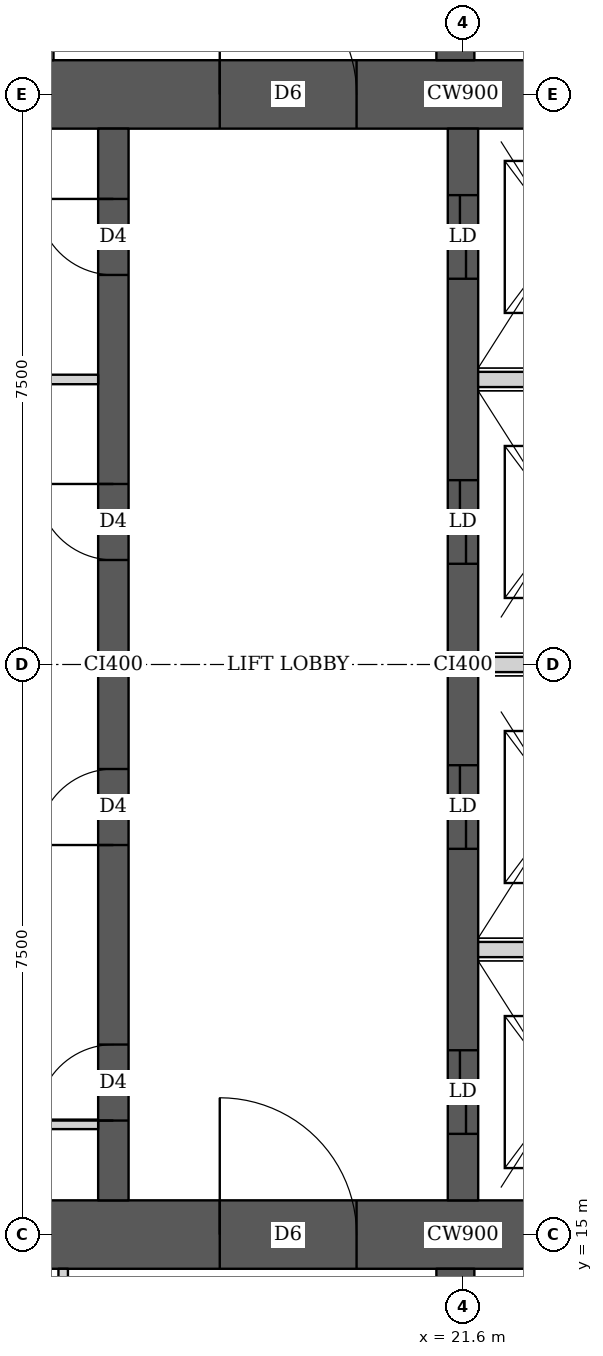
"""IFC4 building model, lengths in metres.
Left out: names, types, materials, properties, quantities, classifications, styles, units other than length and angle.
Written with IfcOpenShell. Run it as: python <this file> out.ifc"""

import sys

from ifc_helpers import new_model, si_unit, direction, frame, frame_2d, origin, place, context, subcontext, project, spatial, rectangle, extrude, element, fill, save


model = new_model("IFC4")
c1 = context("Model", 3, precision=1e-05, world=origin(), true_north=direction((0.0, 1.0)))
c2 = subcontext(c1, "Body", "Model", "MODEL_VIEW")
j1 = project(units=[si_unit("LENGTHUNIT", "METRE"), si_unit("PLANEANGLEUNIT", "RADIAN")], contexts=[c1])
p1 = place(None, origin())
s1 = spatial("IfcSite", under=j1, at=p1, CompositionType="ELEMENT")
p2 = place(p1, origin())
s2 = spatial("IfcBuilding", under=s1, at=p2, CompositionType="ELEMENT")
p3 = place(p2, frame((0.0, 0.0, 242.45)))
s3 = spatial("IfcBuildingStorey", under=s2, at=p3, CompositionType="ELEMENT", Elevation=242.45)
p4 = place(p3, frame((13.95, 15.0, 0.0), z_axis=(0.0, 0.0, 1.0), x_axis=(1.0, 0.0, 0.0)))
e1 = element("IfcWall", 1, at=p4, inside=s3, PredefinedType="SHEAR", context=c2, shape_type="SweptSolid", body=[
    extrude(rectangle(XDim=15.3, YDim=0.9, at=frame_2d((7.65, 0.0))), origin(), (0.0, 0.0, 1.0), 3.75),
])
p5 = place(p4, frame((4.45, 0.0, 0.0)))
e2 = element("IfcOpeningElement", 2, at=p5, cuts=e1, PredefinedType="OPENING", context=c2, shape_type="SweptSolid", body=[
    extrude(rectangle(XDim=1.8, YDim=2.1, at=frame_2d((0.9, 1.05))), frame((0.0, 0.46, 0.0), z_axis=(0.0, -1.0, 0.0), x_axis=(1.0, 0.0, 0.0)), (0.0, 0.0, 1.0), 0.92),
])
p6 = place(p4, frame((10.7, 0.0, 0.0)))
e3 = element("IfcOpeningElement", 3, at=p6, cuts=e1, PredefinedType="OPENING", context=c2, shape_type="SweptSolid", body=[
    extrude(rectangle(XDim=1.1, YDim=2.1, at=frame_2d((0.55, 1.05))), frame((0.0, 0.46, 0.0), z_axis=(0.0, -1.0, 0.0), x_axis=(1.0, 0.0, 0.0)), (0.0, 0.0, 1.0), 0.92),
])
p7 = place(p3, frame((13.95, 30.0, 0.0), z_axis=(0.0, 0.0, 1.0), x_axis=(1.0, 0.0, 0.0)))
e4 = element("IfcWall", 4, at=p7, inside=s3, PredefinedType="SHEAR", context=c2, shape_type="SweptSolid", body=[
    extrude(rectangle(XDim=15.3, YDim=0.9, at=frame_2d((7.65, 0.0))), origin(), (0.0, 0.0, 1.0), 3.75),
])
p8 = place(p7, frame((4.45, 0.0, 0.0)))
e5 = element("IfcOpeningElement", 5, at=p8, cuts=e4, PredefinedType="OPENING", context=c2, shape_type="SweptSolid", body=[
    extrude(rectangle(XDim=1.8, YDim=2.1, at=frame_2d((0.9, 1.05))), frame((0.0, 0.46, 0.0), z_axis=(0.0, -1.0, 0.0), x_axis=(1.0, 0.0, 0.0)), (0.0, 0.0, 1.0), 0.92),
])
p9 = place(p7, frame((10.7, 0.0, 0.0)))
e6 = element("IfcOpeningElement", 6, at=p9, cuts=e4, PredefinedType="OPENING", context=c2, shape_type="SweptSolid", body=[
    extrude(rectangle(XDim=1.1, YDim=2.1, at=frame_2d((0.55, 1.05))), frame((0.0, 0.46, 0.0), z_axis=(0.0, -1.0, 0.0), x_axis=(1.0, 0.0, 0.0)), (0.0, 0.0, 1.0), 0.92),
])
p10 = place(p3, frame((17.0, 15.45, 0.0), z_axis=(0.0, 0.0, 1.0), x_axis=(0.0, 1.0, 0.0)))
e7 = element("IfcWall", 7, at=p10, inside=s3, PredefinedType="SHEAR", context=c2, shape_type="SweptSolid", body=[
    extrude(rectangle(XDim=14.1, YDim=0.4, at=frame_2d((7.05, 0.0))), origin(), (0.0, 0.0, 1.0), 3.75),
])
p11 = place(p10, frame((1.05, 0.0, 0.0)))
e8 = element("IfcOpeningElement", 8, at=p11, cuts=e7, PredefinedType="OPENING", context=c2, shape_type="SweptSolid", body=[
    extrude(rectangle(XDim=1.0, YDim=2.1, at=frame_2d((0.5, 1.05))), frame((0.0, 0.21, 0.0), z_axis=(0.0, -1.0, 0.0), x_axis=(1.0, 0.0, 0.0)), (0.0, 0.0, 1.0), 0.42),
])
p12 = place(p10, frame((4.675, 0.0, 0.0)))
e9 = element("IfcOpeningElement", 9, at=p12, cuts=e7, PredefinedType="OPENING", context=c2, shape_type="SweptSolid", body=[
    extrude(rectangle(XDim=1.0, YDim=2.1, at=frame_2d((0.5, 1.05))), frame((0.0, 0.21, 0.0), z_axis=(0.0, -1.0, 0.0), x_axis=(1.0, 0.0, 0.0)), (0.0, 0.0, 1.0), 0.42),
])
p13 = place(p10, frame((8.425, 0.0, 0.0)))
e10 = element("IfcOpeningElement", 10, at=p13, cuts=e7, PredefinedType="OPENING", context=c2, shape_type="SweptSolid", body=[
    extrude(rectangle(XDim=1.0, YDim=2.1, at=frame_2d((0.5, 1.05))), frame((0.0, 0.21, 0.0), z_axis=(0.0, -1.0, 0.0), x_axis=(1.0, 0.0, 0.0)), (0.0, 0.0, 1.0), 0.42),
])
p14 = place(p10, frame((12.175, 0.0, 0.0)))
e11 = element("IfcOpeningElement", 11, at=p14, cuts=e7, PredefinedType="OPENING", context=c2, shape_type="SweptSolid", body=[
    extrude(rectangle(XDim=1.0, YDim=2.1, at=frame_2d((0.5, 1.05))), frame((0.0, 0.21, 0.0), z_axis=(0.0, -1.0, 0.0), x_axis=(1.0, 0.0, 0.0)), (0.0, 0.0, 1.0), 0.42),
])
p15 = place(p3, frame((21.6, 15.45, 0.0), z_axis=(0.0, 0.0, 1.0), x_axis=(0.0, 1.0, 0.0)))
e12 = element("IfcWall", 12, at=p15, inside=s3, PredefinedType="SHEAR", context=c2, shape_type="SweptSolid", body=[
    extrude(rectangle(XDim=14.1, YDim=0.4, at=frame_2d((7.05, 0.0))), origin(), (0.0, 0.0, 1.0), 3.75),
])
p16 = place(p15, frame((0.875, 0.0, 0.0)))
e13 = element("IfcOpeningElement", 13, at=p16, cuts=e12, PredefinedType="OPENING", context=c2, shape_type="SweptSolid", body=[
    extrude(rectangle(XDim=1.1, YDim=2.1, at=frame_2d((0.55, 1.05))), frame((0.0, 0.21, 0.0), z_axis=(0.0, -1.0, 0.0), x_axis=(1.0, 0.0, 0.0)), (0.0, 0.0, 1.0), 0.42),
])
p17 = place(p15, frame((4.625, 0.0, 0.0)))
e14 = element("IfcOpeningElement", 14, at=p17, cuts=e12, PredefinedType="OPENING", context=c2, shape_type="SweptSolid", body=[
    extrude(rectangle(XDim=1.1, YDim=2.1, at=frame_2d((0.55, 1.05))), frame((0.0, 0.21, 0.0), z_axis=(0.0, -1.0, 0.0), x_axis=(1.0, 0.0, 0.0)), (0.0, 0.0, 1.0), 0.42),
])
p18 = place(p15, frame((8.375, 0.0, 0.0)))
e15 = element("IfcOpeningElement", 15, at=p18, cuts=e12, PredefinedType="OPENING", context=c2, shape_type="SweptSolid", body=[
    extrude(rectangle(XDim=1.1, YDim=2.1, at=frame_2d((0.55, 1.05))), frame((0.0, 0.21, 0.0), z_axis=(0.0, -1.0, 0.0), x_axis=(1.0, 0.0, 0.0)), (0.0, 0.0, 1.0), 0.42),
])
p19 = place(p15, frame((12.125, 0.0, 0.0)))
e16 = element("IfcOpeningElement", 16, at=p19, cuts=e12, PredefinedType="OPENING", context=c2, shape_type="SweptSolid", body=[
    extrude(rectangle(XDim=1.1, YDim=2.1, at=frame_2d((0.55, 1.05))), frame((0.0, 0.21, 0.0), z_axis=(0.0, -1.0, 0.0), x_axis=(1.0, 0.0, 0.0)), (0.0, 0.0, 1.0), 0.42),
])
for number, where, z_axis, x_axis in (
    (17, (21.5, 10.35, 0.0), (0.0, 0.0, 1.0), (0.0, 1.0, 0.0)),
    (18, (21.5, 30.45, 0.0), (0.0, 0.0, 1.0), (0.0, 1.0, 0.0)),
):
    element("IfcWall", number, at=place(p3, frame(where, z_axis=z_axis, x_axis=x_axis)), inside=s3, PredefinedType="SHEAR", context=c2, shape_type="SweptSolid", body=[
        extrude(rectangle(XDim=4.2, YDim=0.5, at=frame_2d((2.1, 0.0))), origin(), (0.0, 0.0, 1.0), 3.75),
    ])
p20 = place(p3, frame((16.34, 10.762, 0.0), z_axis=(0.0, 0.0, 1.0), x_axis=(0.0, 1.0, 0.0)))
e19 = element("IfcWall", 19, at=p20, inside=s3, PredefinedType="PARTITIONING", context=c2, shape_type="SweptSolid", body=[
    extrude(rectangle(XDim=3.788, YDim=0.125, at=frame_2d((1.894, 0.0))), origin(), (0.0, 0.0, 1.0), 3.45),
])
p21 = place(p20, frame((1.338, 0.0, 0.0)))
e20 = element("IfcOpeningElement", 20, at=p21, cuts=e19, PredefinedType="OPENING", context=c2, shape_type="SweptSolid", body=[
    extrude(rectangle(XDim=1.0, YDim=2.1, at=frame_2d((0.5, 1.05))), frame((0.0, 0.073, 0.0), z_axis=(0.0, -1.0, 0.0), x_axis=(1.0, 0.0, 0.0)), (0.0, 0.0, 1.0), 0.145),
])
p22 = place(p3, frame((16.15, 30.45, 0.0), z_axis=(0.0, 0.0, 1.0), x_axis=(0.0, 1.0, 0.0)))
e21 = element("IfcWall", 21, at=p22, inside=s3, PredefinedType="PARTITIONING", context=c2, shape_type="SweptSolid", body=[
    extrude(rectangle(XDim=4.387, YDim=0.125, at=frame_2d((2.193, 0.0))), origin(), (0.0, 0.0, 1.0), 3.45),
])
p23 = place(p22, frame((1.75, 0.0, 0.0)))
e22 = element("IfcOpeningElement", 22, at=p23, cuts=e21, PredefinedType="OPENING", context=c2, shape_type="SweptSolid", body=[
    extrude(rectangle(XDim=1.0, YDim=2.1, at=frame_2d((0.5, 1.05))), frame((0.0, 0.073, 0.0), z_axis=(0.0, -1.0, 0.0), x_axis=(1.0, 0.0, 0.0)), (0.0, 0.0, 1.0), 0.145),
])
p24 = place(p3, frame((14.85, 16.45, 0.0), z_axis=(0.0, 0.0, 1.0), x_axis=(1.0, 0.0, 0.0)))
e23 = element("IfcWall", 23, at=p24, inside=s3, PredefinedType="PARTITIONING", context=c2, shape_type="SweptSolid", body=[
    extrude(rectangle(XDim=1.95, YDim=0.125, at=frame_2d((0.975, 0.0))), origin(), (0.0, 0.0, 1.0), 3.45),
])
p25 = place(p24, frame((0.2, 0.0, 0.0)))
e24 = element("IfcOpeningElement", 24, at=p25, cuts=e23, PredefinedType="OPENING", context=c2, shape_type="SweptSolid", body=[
    extrude(rectangle(XDim=1.0, YDim=2.1, at=frame_2d((0.5, 1.05))), frame((0.0, 0.073, 0.0), z_axis=(0.0, -1.0, 0.0), x_axis=(1.0, 0.0, 0.0)), (0.0, 0.0, 1.0), 0.145),
])
p26 = place(p3, frame((14.85, 26.25, 0.0), z_axis=(0.0, 0.0, 1.0), x_axis=(1.0, 0.0, 0.0)))
e25 = element("IfcWall", 25, at=p26, inside=s3, PredefinedType="PARTITIONING", context=c2, shape_type="SweptSolid", body=[
    extrude(rectangle(XDim=1.95, YDim=0.125, at=frame_2d((0.975, 0.0))), origin(), (0.0, 0.0, 1.0), 3.45),
])
for number, where, z_axis, x_axis in (
    (26, (21.8, 18.75, 0.0), (0.0, 0.0, 1.0), (1.0, 0.0, 0.0)),
    (27, (21.8, 22.5, 0.0), (0.0, 0.0, 1.0), (1.0, 0.0, 0.0)),
    (28, (21.8, 26.25, 0.0), (0.0, 0.0, 1.0), (1.0, 0.0, 0.0)),
):
    element("IfcWall", number, at=place(p3, frame(where, z_axis=z_axis, x_axis=x_axis)), inside=s3, PredefinedType="SOLIDWALL", context=c2, shape_type="SweptSolid", body=[
        extrude(rectangle(XDim=2.2, YDim=0.2, at=frame_2d((1.1, 0.0))), origin(), (0.0, 0.0, 1.0), 3.45),
    ])
p27 = place(p11, origin())
e29 = element("IfcDoor", 29, at=p27, inside=s3, OperationType="SINGLE_SWING_LEFT", PredefinedType="DOOR", context=c2, shape_type="SweptSolid", body=[
    extrude(rectangle(XDim=1.0, YDim=2.1, at=frame_2d((0.5, 1.05))), frame((0.0, 0.025, 0.0), z_axis=(0.0, -1.0, 0.0), x_axis=(1.0, 0.0, 0.0)), (0.0, 0.0, 1.0), 0.05),
])
fill(e8, e29)
p28 = place(p12, origin())
e30 = element("IfcDoor", 30, at=p28, inside=s3, OperationType="SINGLE_SWING_LEFT", PredefinedType="DOOR", context=c2, shape_type="SweptSolid", body=[
    extrude(rectangle(XDim=1.0, YDim=2.1, at=frame_2d((0.5, 1.05))), frame((0.0, 0.025, 0.0), z_axis=(0.0, -1.0, 0.0), x_axis=(1.0, 0.0, 0.0)), (0.0, 0.0, 1.0), 0.05),
])
fill(e9, e30)
p29 = place(p13, origin())
e31 = element("IfcDoor", 31, at=p29, inside=s3, OperationType="SINGLE_SWING_RIGHT", PredefinedType="DOOR", context=c2, shape_type="SweptSolid", body=[
    extrude(rectangle(XDim=1.0, YDim=2.1, at=frame_2d((0.5, 1.05))), frame((0.0, 0.025, 0.0), z_axis=(0.0, -1.0, 0.0), x_axis=(1.0, 0.0, 0.0)), (0.0, 0.0, 1.0), 0.05),
])
fill(e10, e31)
p30 = place(p14, origin())
e32 = element("IfcDoor", 32, at=p30, inside=s3, OperationType="SINGLE_SWING_RIGHT", PredefinedType="DOOR", context=c2, shape_type="SweptSolid", body=[
    extrude(rectangle(XDim=1.0, YDim=2.1, at=frame_2d((0.5, 1.05))), frame((0.0, 0.025, 0.0), z_axis=(0.0, -1.0, 0.0), x_axis=(1.0, 0.0, 0.0)), (0.0, 0.0, 1.0), 0.05),
])
fill(e11, e32)
p31 = place(p5, origin())
e33 = element("IfcDoor", 33, at=p31, inside=s3, OperationType="DOUBLE_DOOR_SINGLE_SWING", PredefinedType="DOOR", context=c2, shape_type="SweptSolid", body=[
    extrude(rectangle(XDim=1.8, YDim=2.1, at=frame_2d((0.9, 1.05))), frame((0.0, 0.025, 0.0), z_axis=(0.0, -1.0, 0.0), x_axis=(1.0, 0.0, 0.0)), (0.0, 0.0, 1.0), 0.05),
])
fill(e2, e33)
p32 = place(p8, origin())
e34 = element("IfcDoor", 34, at=p32, inside=s3, OperationType="DOUBLE_DOOR_SINGLE_SWING", PredefinedType="DOOR", context=c2, shape_type="SweptSolid", body=[
    extrude(rectangle(XDim=1.8, YDim=2.1, at=frame_2d((0.9, 1.05))), frame((0.0, 0.025, 0.0), z_axis=(0.0, -1.0, 0.0), x_axis=(1.0, 0.0, 0.0)), (0.0, 0.0, 1.0), 0.05),
])
fill(e5, e34)
p33 = place(p16, origin())
e35 = element("IfcDoor", 35, at=p33, inside=s3, OperationType="DOUBLE_DOOR_SLIDING", PredefinedType="DOOR", context=c2, shape_type="SweptSolid", body=[
    extrude(rectangle(XDim=1.1, YDim=2.1, at=frame_2d((0.55, 1.05))), frame((0.0, 0.025, 0.0), z_axis=(0.0, -1.0, 0.0), x_axis=(1.0, 0.0, 0.0)), (0.0, 0.0, 1.0), 0.05),
])
fill(e13, e35)
p34 = place(p17, origin())
e36 = element("IfcDoor", 36, at=p34, inside=s3, OperationType="DOUBLE_DOOR_SLIDING", PredefinedType="DOOR", context=c2, shape_type="SweptSolid", body=[
    extrude(rectangle(XDim=1.1, YDim=2.1, at=frame_2d((0.55, 1.05))), frame((0.0, 0.025, 0.0), z_axis=(0.0, -1.0, 0.0), x_axis=(1.0, 0.0, 0.0)), (0.0, 0.0, 1.0), 0.05),
])
fill(e14, e36)
p35 = place(p18, origin())
e37 = element("IfcDoor", 37, at=p35, inside=s3, OperationType="DOUBLE_DOOR_SLIDING", PredefinedType="DOOR", context=c2, shape_type="SweptSolid", body=[
    extrude(rectangle(XDim=1.1, YDim=2.1, at=frame_2d((0.55, 1.05))), frame((0.0, 0.025, 0.0), z_axis=(0.0, -1.0, 0.0), x_axis=(1.0, 0.0, 0.0)), (0.0, 0.0, 1.0), 0.05),
])
fill(e15, e37)
p36 = place(p19, origin())
e38 = element("IfcDoor", 38, at=p36, inside=s3, OperationType="DOUBLE_DOOR_SLIDING", PredefinedType="DOOR", context=c2, shape_type="SweptSolid", body=[
    extrude(rectangle(XDim=1.1, YDim=2.1, at=frame_2d((0.55, 1.05))), frame((0.0, 0.025, 0.0), z_axis=(0.0, -1.0, 0.0), x_axis=(1.0, 0.0, 0.0)), (0.0, 0.0, 1.0), 0.05),
])
fill(e16, e38)
save(model, sys.argv[1])
